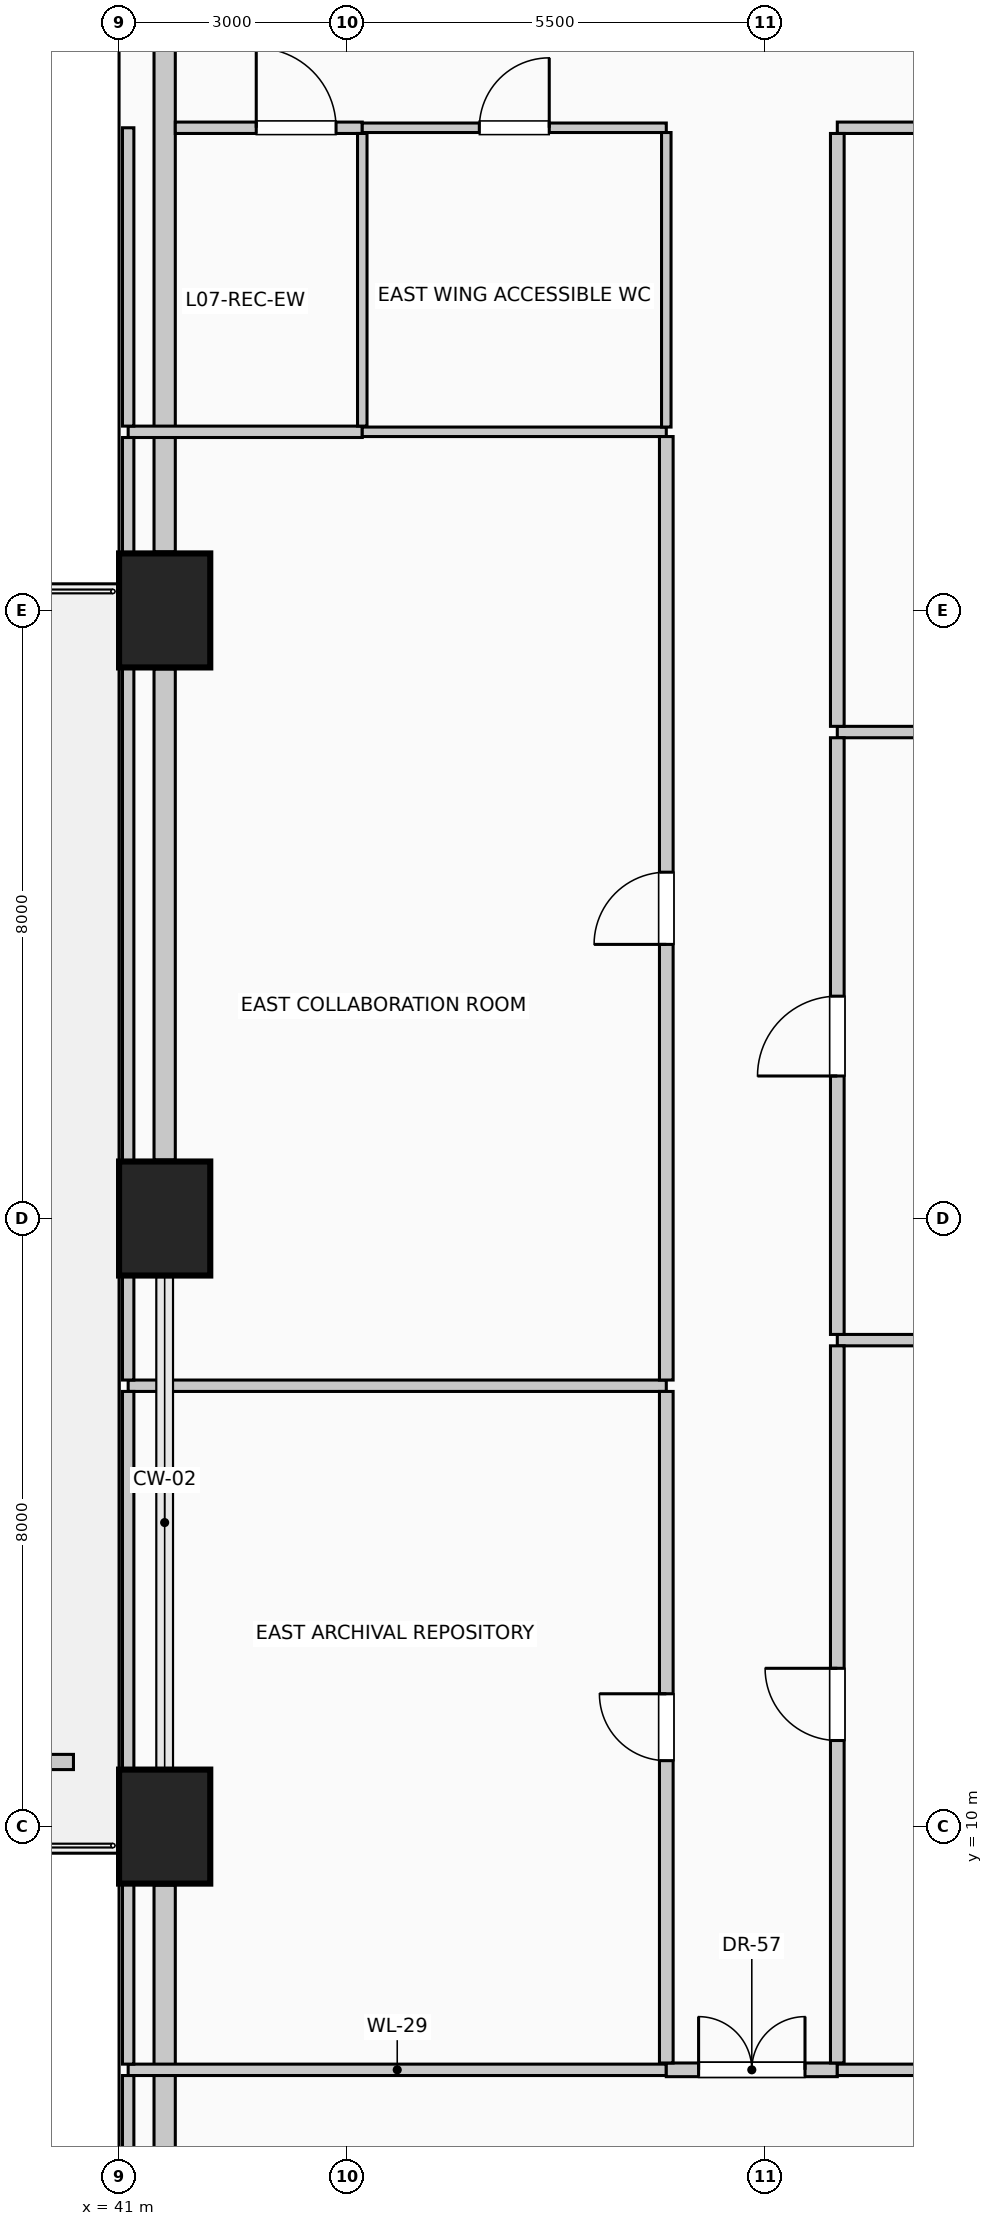
"""IFC4 building model, lengths in metres.
Left out: names, types, materials, properties, quantities, classifications, styles, units other than length and angle.
Written with IfcOpenShell. Run it as: python <this file> out.ifc"""

import sys

from ifc_helpers import new_model, si_unit, direction, frame, frame_2d, origin, origin_2d, place, context, subcontext, project, spatial, rectangle, extrude, element, fill, save


model = new_model("IFC4")
c1 = context("Model", 3, precision=1e-05, world=origin(), true_north=direction((0.0, 1.0)))
c2 = subcontext(c1, "Body", "Model", "MODEL_VIEW")
j1 = project(units=[si_unit("LENGTHUNIT", "METRE"), si_unit("PLANEANGLEUNIT", "RADIAN")], contexts=[c1])
p1 = place(None, origin())
s1 = spatial("IfcSite", under=j1, at=p1, CompositionType="ELEMENT")
p2 = place(p1, origin())
s2 = spatial("IfcBuilding", under=s1, at=p2, CompositionType="ELEMENT")
p3 = place(p2, frame((0.0, 0.0, 30.6)))
s3 = spatial("IfcBuildingStorey", under=s2, at=p3, CompositionType="ELEMENT", Elevation=30.6)
for number, where, z_axis, x_axis in (
    (1, (41.6, 10.0, 0.0), (0.0, 0.0, 1.0), (1.0, 0.0, 0.0)),
    (2, (41.6, 18.0, 0.0), (0.0, 0.0, 1.0), (1.0, 0.0, 0.0)),
    (3, (41.6, 26.0, 0.0), (0.0, 0.0, 1.0), (1.0, 0.0, 0.0)),
):
    element("IfcColumn", number, at=place(p3, frame(where, z_axis=z_axis, x_axis=x_axis)), inside=s3, PredefinedType="COLUMN", context=c2, shape_type="SweptSolid", body=[
        extrude(rectangle(XDim=1.2, YDim=1.5, at=origin_2d()), origin(), (0.0, 0.0, 1.0), 4.0),
    ])
p4 = place(p3, frame((41.6, 1.37, 0.0), z_axis=(0.0, 0.0, 1.0), x_axis=(0.0, 1.0, 0.0)))
e4 = element("IfcWall", 4, at=p4, inside=s3, PredefinedType="SOLIDWALL", context=c2, shape_type="SweptSolid", body=[
    extrude(rectangle(XDim=7.86, YDim=0.28, at=frame_2d((3.93, 0.0))), origin(), (0.0, 0.0, 1.0), 3.0),
])
p5 = place(p4, frame((1.153, 0.0, 0.42)))
e5 = element("IfcOpeningElement", 5, at=p5, cuts=e4, PredefinedType="OPENING", context=c2, shape_type="SweptSolid", body=[
    extrude(rectangle(XDim=2.2, YDim=1.95, at=frame_2d((1.1, 0.975))), frame((0.0, 0.15, 0.0), z_axis=(0.0, -1.0, 0.0), x_axis=(1.0, 0.0, 0.0)), (0.0, 0.0, 1.0), 0.3),
])
p6 = place(p3, frame((41.6, 18.77, 0.0), z_axis=(0.0, 0.0, 1.0), x_axis=(0.0, 1.0, 0.0)))
e6 = element("IfcWall", 6, at=p6, inside=s3, PredefinedType="SOLIDWALL", context=c2, shape_type="SweptSolid", body=[
    extrude(rectangle(XDim=6.46, YDim=0.28, at=frame_2d((3.23, 0.0))), origin(), (0.0, 0.0, 1.0), 3.0),
])
p7 = place(p3, frame((41.6, 26.77, 0.0), z_axis=(0.0, 0.0, 1.0), x_axis=(0.0, 1.0, 0.0)))
e7 = element("IfcWall", 7, at=p7, inside=s3, PredefinedType="SOLIDWALL", context=c2, shape_type="SweptSolid", body=[
    extrude(rectangle(XDim=6.71, YDim=0.28, at=frame_2d((3.355, 0.0))), origin(), (0.0, 0.0, 1.0), 3.0),
])
p8 = place(p3, frame((17.6, 10.85, 0.0), z_axis=(0.0, 0.0, 1.0), x_axis=(1.0, 0.0, 0.0)))
e8 = element("IfcWall", 8, at=p8, inside=s3, PredefinedType="USERDEFINED", context=c2, shape_type="SweptSolid", body=[
    extrude(rectangle(XDim=22.8, YDim=0.2, at=frame_2d((11.4, 0.0))), origin(), (0.0, 0.0, 1.0), 0.55),
])
p9 = place(p3, frame((41.12, 6.8, 0.0), z_axis=(0.0, 0.0, 1.0), x_axis=(1.0, 0.0, 0.0)))
e9 = element("IfcWall", 9, at=p9, inside=s3, PredefinedType="PARTITIONING", context=c2, shape_type="SweptSolid", body=[
    extrude(rectangle(XDim=7.08, YDim=0.15, at=frame_2d((3.54, 0.0))), origin(), (0.0, 0.0, 1.0), 3.095),
])
p10 = place(p3, frame((48.2, 6.8, 0.0), z_axis=(0.0, 0.0, 1.0), x_axis=(1.0, 0.0, 0.0)))
e10 = element("IfcWall", 10, at=p10, inside=s3, PredefinedType="PARTITIONING", context=c2, shape_type="SweptSolid", body=[
    extrude(rectangle(XDim=2.25, YDim=0.18, at=frame_2d((1.125, 0.0))), origin(), (0.0, 0.0, 1.0), 3.095),
])
p11 = place(p10, frame((0.425, 0.0, 0.0)))
e11 = element("IfcOpeningElement", 11, at=p11, cuts=e10, PredefinedType="OPENING", context=c2, shape_type="SweptSolid", body=[
    extrude(rectangle(XDim=1.4, YDim=2.2, at=frame_2d((0.7, 1.1))), frame((0.0, 0.1, 0.0), z_axis=(0.0, -1.0, 0.0), x_axis=(1.0, 0.0, 0.0)), (0.0, 0.0, 1.0), 0.2),
])
p12 = place(p3, frame((50.45, 6.8, 0.0), z_axis=(0.0, 0.0, 1.0), x_axis=(1.0, 0.0, 0.0)))
e12 = element("IfcWall", 12, at=p12, inside=s3, PredefinedType="PARTITIONING", context=c2, shape_type="SweptSolid", body=[
    extrude(rectangle(XDim=6.81, YDim=0.15, at=frame_2d((3.405, 0.0))), origin(), (0.0, 0.0, 1.0), 3.095),
])
p13 = place(p3, frame((41.12, 15.8, 0.0), z_axis=(0.0, 0.0, 1.0), x_axis=(1.0, 0.0, 0.0)))
e13 = element("IfcWall", 13, at=p13, inside=s3, PredefinedType="PARTITIONING", context=c2, shape_type="SweptSolid", body=[
    extrude(rectangle(XDim=7.08, YDim=0.15, at=frame_2d((3.54, 0.0))), origin(), (0.0, 0.0, 1.0), 3.7),
])
for number, where, z_axis, x_axis in (
    (14, (50.45, 16.4, 0.0), (0.0, 0.0, 1.0), (1.0, 0.0, 0.0)),
    (15, (50.45, 24.4, 0.0), (0.0, 0.0, 1.0), (1.0, 0.0, 0.0)),
):
    element("IfcWall", number, at=place(p3, frame(where, z_axis=z_axis, x_axis=x_axis)), inside=s3, PredefinedType="PARTITIONING", context=c2, shape_type="SweptSolid", body=[
        extrude(rectangle(XDim=6.81, YDim=0.15, at=frame_2d((3.405, 0.0))), origin(), (0.0, 0.0, 1.0), 3.7),
    ])
p14 = place(p3, frame((41.12, 28.35, 0.0), z_axis=(0.0, 0.0, 1.0), x_axis=(1.0, 0.0, 0.0)))
e16 = element("IfcWall", 16, at=p14, inside=s3, PredefinedType="PARTITIONING", context=c2, shape_type="SweptSolid", body=[
    extrude(rectangle(XDim=3.08, YDim=0.15, at=frame_2d((1.54, 0.0))), origin(), (0.0, 0.0, 1.0), 3.7),
])
p15 = place(p3, frame((44.2, 28.35, 0.0), z_axis=(0.0, 0.0, 1.0), x_axis=(1.0, 0.0, 0.0)))
e17 = element("IfcWall", 17, at=p15, inside=s3, PredefinedType="PARTITIONING", context=c2, shape_type="SweptSolid", body=[
    extrude(rectangle(XDim=4.0, YDim=0.125, at=frame_2d((2.0, 0.0))), origin(), (0.0, 0.0, 1.0), 3.7),
])
p16 = place(p3, frame((41.74, 32.35, 0.0), z_axis=(0.0, 0.0, 1.0), x_axis=(1.0, 0.0, 0.0)))
e18 = element("IfcWall", 18, at=p16, inside=s3, PredefinedType="PARTITIONING", context=c2, shape_type="SweptSolid", body=[
    extrude(rectangle(XDim=2.46, YDim=0.15, at=frame_2d((1.23, 0.0))), origin(), (0.0, 0.0, 1.0), 3.7),
])
p17 = place(p16, frame((1.065, 0.0, 0.0)))
e19 = element("IfcOpeningElement", 19, at=p17, cuts=e18, PredefinedType="OPENING", context=c2, shape_type="SweptSolid", body=[
    extrude(rectangle(XDim=1.05, YDim=2.15, at=frame_2d((0.525, 1.075))), frame((0.0, 0.085, 0.0), z_axis=(0.0, -1.0, 0.0), x_axis=(1.0, 0.0, 0.0)), (0.0, 0.0, 1.0), 0.17),
])
p18 = place(p3, frame((44.2, 32.35, 0.0), z_axis=(0.0, 0.0, 1.0), x_axis=(1.0, 0.0, 0.0)))
e20 = element("IfcWall", 20, at=p18, inside=s3, PredefinedType="PARTITIONING", context=c2, shape_type="SweptSolid", body=[
    extrude(rectangle(XDim=4.0, YDim=0.125, at=frame_2d((2.0, 0.0))), origin(), (0.0, 0.0, 1.0), 3.7),
])
p19 = place(p18, frame((1.54, 0.0, 0.0)))
e21 = element("IfcOpeningElement", 21, at=p19, cuts=e20, PredefinedType="OPENING", context=c2, shape_type="SweptSolid", body=[
    extrude(rectangle(XDim=0.92, YDim=2.1, at=frame_2d((0.46, 1.05))), frame((0.0, 0.073, 0.0), z_axis=(0.0, -1.0, 0.0), x_axis=(1.0, 0.0, 0.0)), (0.0, 0.0, 1.0), 0.145),
])
p20 = place(p3, frame((50.45, 32.35, 0.0), z_axis=(0.0, 0.0, 1.0), x_axis=(1.0, 0.0, 0.0)))
e22 = element("IfcWall", 22, at=p20, inside=s3, PredefinedType="PARTITIONING", context=c2, shape_type="SweptSolid", body=[
    extrude(rectangle(XDim=4.0, YDim=0.15, at=frame_2d((2.0, 0.0))), origin(), (0.0, 0.0, 1.0), 3.7),
])
p21 = place(p20, frame((1.475, 0.0, 0.0)))
e23 = element("IfcOpeningElement", 23, at=p21, cuts=e22, PredefinedType="OPENING", context=c2, shape_type="SweptSolid", body=[
    extrude(rectangle(XDim=1.05, YDim=2.15, at=frame_2d((0.525, 1.075))), frame((0.0, 0.085, 0.0), z_axis=(0.0, -1.0, 0.0), x_axis=(1.0, 0.0, 0.0)), (0.0, 0.0, 1.0), 0.17),
])
p22 = place(p3, frame((41.12, 1.35, 0.0), z_axis=(0.0, 0.0, 1.0), x_axis=(0.0, 1.0, 0.0)))
e24 = element("IfcWall", 24, at=p22, inside=s3, PredefinedType="PARTITIONING", context=c2, shape_type="SweptSolid", body=[
    extrude(rectangle(XDim=5.375, YDim=0.15, at=frame_2d((2.688, 0.0))), origin(), (0.0, 0.0, 1.0), 3.7),
])
p23 = place(p3, frame((41.12, 6.875, 0.0), z_axis=(0.0, 0.0, 1.0), x_axis=(0.0, 1.0, 0.0)))
e25 = element("IfcWall", 25, at=p23, inside=s3, PredefinedType="PARTITIONING", context=c2, shape_type="SweptSolid", body=[
    extrude(rectangle(XDim=2.375, YDim=0.15, at=frame_2d((1.188, 0.0))), origin(), (0.0, 0.0, 1.0), 3.7),
])
p24 = place(p3, frame((41.12, 10.75, 0.0), z_axis=(0.0, 0.0, 1.0), x_axis=(0.0, 1.0, 0.0)))
e26 = element("IfcWall", 26, at=p24, inside=s3, PredefinedType="PARTITIONING", context=c2, shape_type="SweptSolid", body=[
    extrude(rectangle(XDim=4.975, YDim=0.15, at=frame_2d((2.488, 0.0))), origin(), (0.0, 0.0, 1.0), 3.7),
])
p25 = place(p3, frame((41.12, 15.875, 0.0), z_axis=(0.0, 0.0, 1.0), x_axis=(0.0, 1.0, 0.0)))
e27 = element("IfcWall", 27, at=p25, inside=s3, PredefinedType="PARTITIONING", context=c2, shape_type="SweptSolid", body=[
    extrude(rectangle(XDim=1.375, YDim=0.15, at=frame_2d((0.688, 0.0))), origin(), (0.0, 0.0, 1.0), 3.7),
])
p26 = place(p3, frame((41.12, 18.75, 0.0), z_axis=(0.0, 0.0, 1.0), x_axis=(0.0, 1.0, 0.0)))
e28 = element("IfcWall", 28, at=p26, inside=s3, PredefinedType="PARTITIONING", context=c2, shape_type="SweptSolid", body=[
    extrude(rectangle(XDim=6.5, YDim=0.15, at=frame_2d((3.25, 0.0))), origin(), (0.0, 0.0, 1.0), 3.7),
])
p27 = place(p3, frame((41.12, 26.75, 0.0), z_axis=(0.0, 0.0, 1.0), x_axis=(0.0, 1.0, 0.0)))
e29 = element("IfcWall", 29, at=p27, inside=s3, PredefinedType="PARTITIONING", context=c2, shape_type="SweptSolid", body=[
    extrude(rectangle(XDim=1.525, YDim=0.15, at=frame_2d((0.762, 0.0))), origin(), (0.0, 0.0, 1.0), 3.7),
])
p28 = place(p3, frame((41.12, 28.425, 0.0), z_axis=(0.0, 0.0, 1.0), x_axis=(0.0, 1.0, 0.0)))
e30 = element("IfcWall", 30, at=p28, inside=s3, PredefinedType="PARTITIONING", context=c2, shape_type="SweptSolid", body=[
    extrude(rectangle(XDim=3.925, YDim=0.15, at=frame_2d((1.962, 0.0))), origin(), (0.0, 0.0, 1.0), 3.7),
])
p29 = place(p3, frame((44.2, 28.425, 0.0), z_axis=(0.0, 0.0, 1.0), x_axis=(0.0, 1.0, 0.0)))
e31 = element("IfcWall", 31, at=p29, inside=s3, PredefinedType="PARTITIONING", context=c2, shape_type="SweptSolid", body=[
    extrude(rectangle(XDim=3.85, YDim=0.125, at=frame_2d((1.925, 0.0))), origin(), (0.0, 0.0, 1.0), 3.7),
])
p30 = place(p3, frame((48.2, 6.89, 0.0), z_axis=(0.0, 0.0, 1.0), x_axis=(0.0, 1.0, 0.0)))
e32 = element("IfcWall", 32, at=p30, inside=s3, PredefinedType="PARTITIONING", context=c2, shape_type="SweptSolid", body=[
    extrude(rectangle(XDim=8.835, YDim=0.18, at=frame_2d((4.417, 0.0))), origin(), (0.0, 0.0, 1.0), 3.7),
])
p31 = place(p30, frame((3.978, 0.0, 0.0)))
e33 = element("IfcOpeningElement", 33, at=p31, cuts=e32, PredefinedType="OPENING", context=c2, shape_type="SweptSolid", body=[
    extrude(rectangle(XDim=0.88, YDim=2.1, at=frame_2d((0.44, 1.05))), frame((0.0, 0.1, 0.0), z_axis=(0.0, -1.0, 0.0), x_axis=(1.0, 0.0, 0.0)), (0.0, 0.0, 1.0), 0.2),
])
p32 = place(p3, frame((48.2, 15.875, 0.0), z_axis=(0.0, 0.0, 1.0), x_axis=(0.0, 1.0, 0.0)))
e34 = element("IfcWall", 34, at=p32, inside=s3, PredefinedType="PARTITIONING", context=c2, shape_type="SweptSolid", body=[
    extrude(rectangle(XDim=12.413, YDim=0.18, at=frame_2d((6.206, 0.0))), origin(), (0.0, 0.0, 1.0), 3.7),
])
p33 = place(p32, frame((5.731, 0.0, 0.0)))
e35 = element("IfcOpeningElement", 35, at=p33, cuts=e34, PredefinedType="OPENING", context=c2, shape_type="SweptSolid", body=[
    extrude(rectangle(XDim=0.95, YDim=2.15, at=frame_2d((0.475, 1.075))), frame((0.0, 0.1, 0.0), z_axis=(0.0, -1.0, 0.0), x_axis=(1.0, 0.0, 0.0)), (0.0, 0.0, 1.0), 0.2),
])
p34 = place(p3, frame((48.2, 28.413, 0.0), z_axis=(0.0, 0.0, 1.0), x_axis=(0.0, 1.0, 0.0)))
e36 = element("IfcWall", 36, at=p34, inside=s3, PredefinedType="PARTITIONING", context=c2, shape_type="SweptSolid", body=[
    extrude(rectangle(XDim=3.875, YDim=0.125, at=frame_2d((1.938, 0.0))), origin(), (0.0, 0.0, 1.0), 3.7),
])
p35 = place(p3, frame((50.45, 6.89, 0.0), z_axis=(0.0, 0.0, 1.0), x_axis=(0.0, 1.0, 0.0)))
e37 = element("IfcWall", 37, at=p35, inside=s3, PredefinedType="PARTITIONING", context=c2, shape_type="SweptSolid", body=[
    extrude(rectangle(XDim=9.435, YDim=0.18, at=frame_2d((4.718, 0.0))), origin(), (0.0, 0.0, 1.0), 3.7),
])
p36 = place(p35, frame((4.242, 0.0, 0.0)))
e38 = element("IfcOpeningElement", 38, at=p36, cuts=e37, PredefinedType="OPENING", context=c2, shape_type="SweptSolid", body=[
    extrude(rectangle(XDim=0.95, YDim=2.15, at=frame_2d((0.475, 1.075))), frame((0.0, 0.1, 0.0), z_axis=(0.0, -1.0, 0.0), x_axis=(1.0, 0.0, 0.0)), (0.0, 0.0, 1.0), 0.2),
])
p37 = place(p3, frame((50.45, 16.475, 0.0), z_axis=(0.0, 0.0, 1.0), x_axis=(0.0, 1.0, 0.0)))
e39 = element("IfcWall", 39, at=p37, inside=s3, PredefinedType="PARTITIONING", context=c2, shape_type="SweptSolid", body=[
    extrude(rectangle(XDim=7.85, YDim=0.18, at=frame_2d((3.925, 0.0))), origin(), (0.0, 0.0, 1.0), 3.7),
])
p38 = place(p37, frame((3.4, 0.0, 0.0)))
e40 = element("IfcOpeningElement", 40, at=p38, cuts=e39, PredefinedType="OPENING", context=c2, shape_type="SweptSolid", body=[
    extrude(rectangle(XDim=1.05, YDim=2.15, at=frame_2d((0.525, 1.075))), frame((0.0, 0.1, 0.0), z_axis=(0.0, -1.0, 0.0), x_axis=(1.0, 0.0, 0.0)), (0.0, 0.0, 1.0), 0.2),
])
p39 = place(p3, frame((50.45, 24.475, 0.0), z_axis=(0.0, 0.0, 1.0), x_axis=(0.0, 1.0, 0.0)))
e41 = element("IfcWall", 41, at=p39, inside=s3, PredefinedType="PARTITIONING", context=c2, shape_type="SweptSolid", body=[
    extrude(rectangle(XDim=7.8, YDim=0.18, at=frame_2d((3.9, 0.0))), origin(), (0.0, 0.0, 1.0), 3.7),
])
p40 = place(p11, origin())
e42 = element("IfcDoor", 42, at=p40, inside=s3, OperationType="DOUBLE_DOOR_SINGLE_SWING", PredefinedType="DOOR", context=c2, shape_type="SweptSolid", body=[
    extrude(rectangle(XDim=1.4, YDim=2.2, at=frame_2d((0.7, 1.1))), frame((0.0, 0.025, 0.0), z_axis=(0.0, -1.0, 0.0), x_axis=(1.0, 0.0, 0.0)), (0.0, 0.0, 1.0), 0.05),
])
fill(e11, e42)
p41 = place(p17, origin())
e43 = element("IfcDoor", 43, at=p41, inside=s3, OperationType="SINGLE_SWING_LEFT", PredefinedType="DOOR", context=c2, shape_type="SweptSolid", body=[
    extrude(rectangle(XDim=1.05, YDim=2.15, at=frame_2d((0.525, 1.075))), frame((0.0, 0.025, 0.0), z_axis=(0.0, -1.0, 0.0), x_axis=(1.0, 0.0, 0.0)), (0.0, 0.0, 1.0), 0.05),
])
fill(e19, e43)
p42 = place(p19, origin())
e44 = element("IfcDoor", 44, at=p42, inside=s3, OperationType="SINGLE_SWING_RIGHT", PredefinedType="DOOR", context=c2, shape_type="SweptSolid", body=[
    extrude(rectangle(XDim=0.92, YDim=2.1, at=frame_2d((0.46, 1.05))), frame((0.0, 0.025, 0.0), z_axis=(0.0, -1.0, 0.0), x_axis=(1.0, 0.0, 0.0)), (0.0, 0.0, 1.0), 0.05),
])
fill(e21, e44)
p43 = place(p31, origin())
e45 = element("IfcDoor", 45, at=p43, inside=s3, OperationType="SINGLE_SWING_RIGHT", PredefinedType="DOOR", context=c2, shape_type="SweptSolid", body=[
    extrude(rectangle(XDim=0.88, YDim=2.1, at=frame_2d((0.44, 1.05))), frame((0.0, 0.025, 0.0), z_axis=(0.0, -1.0, 0.0), x_axis=(1.0, 0.0, 0.0)), (0.0, 0.0, 1.0), 0.05),
])
fill(e33, e45)
p44 = place(p33, origin())
e46 = element("IfcDoor", 46, at=p44, inside=s3, OperationType="SINGLE_SWING_LEFT", PredefinedType="DOOR", context=c2, shape_type="SweptSolid", body=[
    extrude(rectangle(XDim=0.95, YDim=2.15, at=frame_2d((0.475, 1.075))), frame((0.0, 0.025, 0.0), z_axis=(0.0, -1.0, 0.0), x_axis=(1.0, 0.0, 0.0)), (0.0, 0.0, 1.0), 0.05),
])
fill(e35, e46)
p45 = place(p36, origin())
e47 = element("IfcDoor", 47, at=p45, inside=s3, OperationType="SINGLE_SWING_RIGHT", PredefinedType="DOOR", context=c2, shape_type="SweptSolid", body=[
    extrude(rectangle(XDim=0.95, YDim=2.15, at=frame_2d((0.475, 1.075))), frame((0.0, 0.025, 0.0), z_axis=(0.0, -1.0, 0.0), x_axis=(1.0, 0.0, 0.0)), (0.0, 0.0, 1.0), 0.05),
])
fill(e38, e47)
p46 = place(p38, origin())
e48 = element("IfcDoor", 48, at=p46, inside=s3, OperationType="SINGLE_SWING_LEFT", PredefinedType="DOOR", context=c2, shape_type="SweptSolid", body=[
    extrude(rectangle(XDim=1.05, YDim=2.15, at=frame_2d((0.525, 1.075))), frame((0.0, 0.025, 0.0), z_axis=(0.0, -1.0, 0.0), x_axis=(1.0, 0.0, 0.0)), (0.0, 0.0, 1.0), 0.05),
])
fill(e40, e48)
save(model, sys.argv[1])
